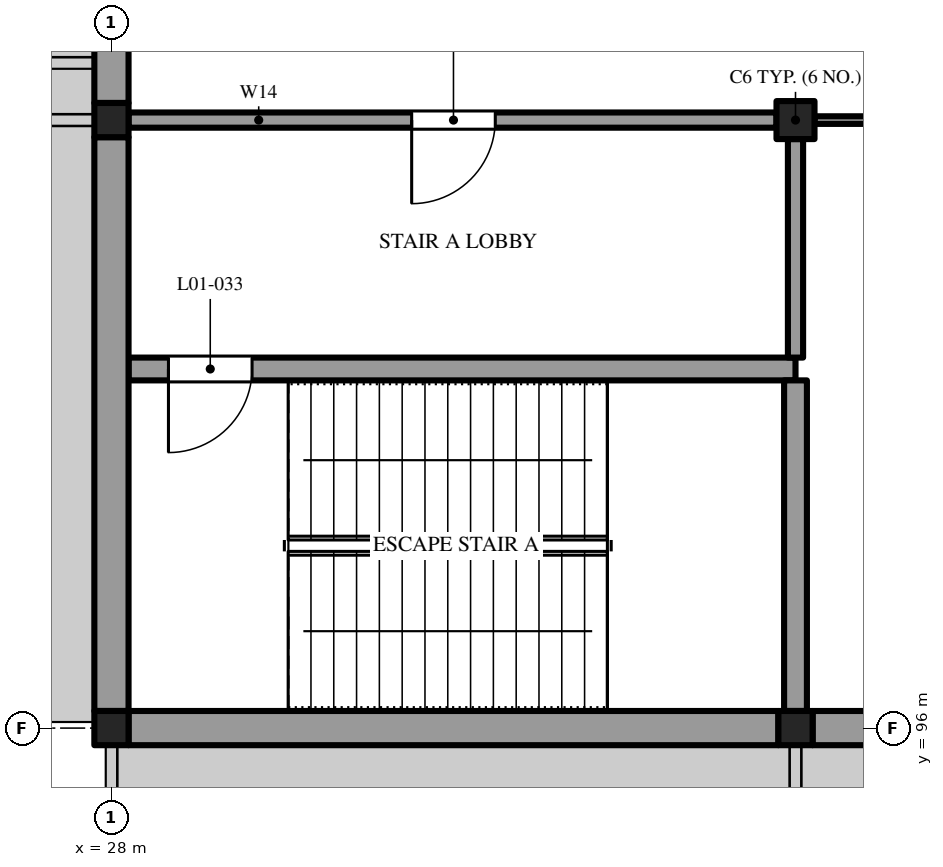
"""IFC4 building model, lengths in metres.
Left out: names, types, materials, properties, quantities, classifications, styles, units other than length and angle.
Written with IfcOpenShell. Run it as: python <this file> out.ifc"""

import sys

from ifc_helpers import new_model, si_unit, direction, frame, frame_2d, origin, origin_2d, place, context, subcontext, project, spatial, rectangle, extrude, element, fill, save


model = new_model("IFC4")
c1 = context("Model", 3, precision=1e-05, world=origin(), true_north=direction((0.0, 1.0)))
c2 = subcontext(c1, "Body", "Model", "MODEL_VIEW")
j1 = project(units=[si_unit("LENGTHUNIT", "METRE"), si_unit("PLANEANGLEUNIT", "RADIAN")], contexts=[c1])
p1 = place(None, origin())
s1 = spatial("IfcSite", under=j1, at=p1, CompositionType="ELEMENT")
p2 = place(p1, origin())
s2 = spatial("IfcBuilding", under=s1, at=p2, CompositionType="ELEMENT")
p3 = place(p2, frame((0.0, 0.0, 7.2)))
s3 = spatial("IfcBuildingStorey", under=s2, at=p3, CompositionType="ELEMENT", Elevation=7.2)
for number, where, z_axis, x_axis in (
    (1, (28.0, 96.0, 0.0), (0.0, 0.0, 1.0), (1.0, 0.0, 0.0)),
    (2, (28.0, 104.0, 0.0), (0.0, 0.0, 1.0), (1.0, 0.0, 0.0)),
    (3, (37.0, 96.0, 0.0), (0.0, 0.0, 1.0), (1.0, 0.0, 0.0)),
):
    element("IfcColumn", number, at=place(p3, frame(where, z_axis=z_axis, x_axis=x_axis)), inside=s3, PredefinedType="COLUMN", context=c2, shape_type="SweptSolid", body=[
        extrude(rectangle(XDim=0.45, YDim=0.45, at=origin_2d()), origin(), (0.0, 0.0, 1.0), 4.8),
    ])
p4 = place(p3, frame((37.0, 104.0, 0.0), z_axis=(0.0, 0.0, 1.0), x_axis=(1.0, 0.0, 0.0)))
e4 = element("IfcColumn", 4, at=p4, inside=s3, PredefinedType="COLUMN", context=c2, shape_type="SweptSolid", body=[
    extrude(rectangle(XDim=0.5, YDim=0.5, at=origin_2d()), origin(), (0.0, 0.0, 1.0), 4.8),
])
p5 = place(p3, frame((28.225, 96.0, 0.0), z_axis=(0.0, 0.0, 1.0), x_axis=(1.0, 0.0, 0.0)))
e5 = element("IfcWall", 5, at=p5, inside=s3, PredefinedType="SOLIDWALL", context=c2, shape_type="SweptSolid", body=[
    extrude(rectangle(XDim=8.55, YDim=0.45, at=frame_2d((4.275, 0.0))), origin(), (0.0, 0.0, 1.0), 4.5),
])
p6 = place(p3, frame((37.225, 96.0, 0.0), z_axis=(0.0, 0.0, 1.0), x_axis=(1.0, 0.0, 0.0)))
e6 = element("IfcWall", 6, at=p6, inside=s3, PredefinedType="SOLIDWALL", context=c2, shape_type="SweptSolid", body=[
    extrude(rectangle(XDim=8.55, YDim=0.45, at=frame_2d((4.275, 0.0))), origin(), (0.0, 0.0, 1.0), 4.5),
])
p7 = place(p6, frame((0.975, 0.0, 0.9)))
e7 = element("IfcOpeningElement", 7, at=p7, cuts=e6, PredefinedType="OPENING", context=c2, shape_type="SweptSolid", body=[
    extrude(rectangle(XDim=2.1, YDim=2.2, at=frame_2d((1.05, 1.1))), frame((0.0, 0.235, 0.0), z_axis=(0.0, -1.0, 0.0), x_axis=(1.0, 0.0, 0.0)), (0.0, 0.0, 1.0), 0.47),
])
p8 = place(p6, frame((5.475, 0.0, 0.9)))
e8 = element("IfcOpeningElement", 8, at=p8, cuts=e6, PredefinedType="OPENING", context=c2, shape_type="SweptSolid", body=[
    extrude(rectangle(XDim=2.1, YDim=2.2, at=frame_2d((1.05, 1.1))), frame((0.0, 0.235, 0.0), z_axis=(0.0, -1.0, 0.0), x_axis=(1.0, 0.0, 0.0)), (0.0, 0.0, 1.0), 0.47),
])
p9 = place(p3, frame((28.225, 100.725, 0.0), z_axis=(0.0, 0.0, 1.0), x_axis=(1.0, 0.0, 0.0)))
e9 = element("IfcWall", 9, at=p9, inside=s3, PredefinedType="SHEAR", context=c2, shape_type="SweptSolid", body=[
    extrude(rectangle(XDim=8.775, YDim=0.3, at=frame_2d((4.387, 0.0))), origin(), (0.0, 0.0, 1.0), 4.5),
])
p10 = place(p9, frame((0.525, 0.0, 0.0)))
e10 = element("IfcOpeningElement", 10, at=p10, cuts=e9, PredefinedType="OPENING", context=c2, shape_type="SweptSolid", body=[
    extrude(rectangle(XDim=1.1, YDim=2.1, at=frame_2d((0.55, 1.05))), frame((0.0, 0.16, 0.0), z_axis=(0.0, -1.0, 0.0), x_axis=(1.0, 0.0, 0.0)), (0.0, 0.0, 1.0), 0.32),
])
p11 = place(p3, frame((28.225, 104.0, 0.0), z_axis=(0.0, 0.0, 1.0), x_axis=(1.0, 0.0, 0.0)))
e11 = element("IfcWall", 11, at=p11, inside=s3, PredefinedType="SOLIDWALL", context=c2, shape_type="SweptSolid", body=[
    extrude(rectangle(XDim=8.525, YDim=0.2, at=frame_2d((4.262, 0.0))), origin(), (0.0, 0.0, 1.0), 4.5),
])
p12 = place(p11, frame((3.725, 0.0, 0.0)))
e12 = element("IfcOpeningElement", 12, at=p12, cuts=e11, PredefinedType="OPENING", context=c2, shape_type="SweptSolid", body=[
    extrude(rectangle(XDim=1.1, YDim=2.1, at=frame_2d((0.55, 1.05))), frame((0.0, 0.11, 0.0), z_axis=(0.0, -1.0, 0.0), x_axis=(1.0, 0.0, 0.0)), (0.0, 0.0, 1.0), 0.22),
])
p13 = place(p3, frame((37.25, 104.0, 0.0), z_axis=(0.0, 0.0, 1.0), x_axis=(1.0, 0.0, 0.0)))
e13 = element("IfcWall", 13, at=p13, inside=s3, PredefinedType="PARTITIONING", context=c2, shape_type="SweptSolid", body=[
    extrude(rectangle(XDim=8.5, YDim=0.1, at=frame_2d((4.25, 0.0))), origin(), (0.0, 0.0, 1.0), 4.5),
])
p14 = place(p13, frame((5.25, 0.0, 0.0)))
e14 = element("IfcOpeningElement", 14, at=p14, cuts=e13, PredefinedType="OPENING", context=c2, shape_type="SweptSolid", body=[
    extrude(rectangle(XDim=1.0, YDim=2.1, at=frame_2d((0.5, 1.05))), frame((0.0, 0.06, 0.0), z_axis=(0.0, -1.0, 0.0), x_axis=(1.0, 0.0, 0.0)), (0.0, 0.0, 1.0), 0.12),
])
p15 = place(p3, frame((28.0, 103.775, 0.0), z_axis=(0.0, 0.0, 1.0), x_axis=(0.0, -1.0, 0.0)))
e15 = element("IfcWall", 15, at=p15, inside=s3, PredefinedType="SOLIDWALL", context=c2, shape_type="SweptSolid", body=[
    extrude(rectangle(XDim=7.55, YDim=0.45, at=frame_2d((3.775, 0.0))), origin(), (0.0, 0.0, 1.0), 4.5),
])
p16 = place(p3, frame((28.0, 111.775, 0.0), z_axis=(0.0, 0.0, 1.0), x_axis=(0.0, -1.0, 0.0)))
e16 = element("IfcWall", 16, at=p16, inside=s3, PredefinedType="SOLIDWALL", context=c2, shape_type="SweptSolid", body=[
    extrude(rectangle(XDim=7.55, YDim=0.45, at=frame_2d((3.775, 0.0))), origin(), (0.0, 0.0, 1.0), 4.5),
])
p17 = place(p16, frame((4.725, 0.0, 0.9)))
e17 = element("IfcOpeningElement", 17, at=p17, cuts=e16, PredefinedType="OPENING", context=c2, shape_type="SweptSolid", body=[
    extrude(rectangle(XDim=2.1, YDim=2.2, at=frame_2d((1.05, 1.1))), frame((0.0, 0.235, 0.0), z_axis=(0.0, -1.0, 0.0), x_axis=(1.0, 0.0, 0.0)), (0.0, 0.0, 1.0), 0.47),
])
p18 = place(p16, frame((0.725, 0.0, 0.9)))
e18 = element("IfcOpeningElement", 18, at=p18, cuts=e16, PredefinedType="OPENING", context=c2, shape_type="SweptSolid", body=[
    extrude(rectangle(XDim=2.1, YDim=2.2, at=frame_2d((1.05, 1.1))), frame((0.0, 0.235, 0.0), z_axis=(0.0, -1.0, 0.0), x_axis=(1.0, 0.0, 0.0)), (0.0, 0.0, 1.0), 0.47),
])
p19 = place(p3, frame((37.0, 96.225, 0.0), z_axis=(0.0, 0.0, 1.0), x_axis=(0.0, 1.0, 0.0)))
e19 = element("IfcWall", 19, at=p19, inside=s3, PredefinedType="SHEAR", context=c2, shape_type="SweptSolid", body=[
    extrude(rectangle(XDim=4.35, YDim=0.3, at=frame_2d((2.175, 0.0))), origin(), (0.0, 0.0, 1.0), 4.5),
])
p20 = place(p3, frame((37.0, 100.875, 0.0), z_axis=(0.0, 0.0, 1.0), x_axis=(0.0, 1.0, 0.0)))
e20 = element("IfcWall", 20, at=p20, inside=s3, PredefinedType="SOLIDWALL", context=c2, shape_type="SweptSolid", body=[
    extrude(rectangle(XDim=2.875, YDim=0.2, at=frame_2d((1.438, 0.0))), origin(), (0.0, 0.0, 1.0), 4.5),
])
p21 = place(p12, frame((1.1, 0.0, 0.0), z_axis=(0.0, 0.0, 1.0), x_axis=(-1.0, 0.0, 0.0)))
e21 = element("IfcDoor", 21, at=p21, inside=s3, OperationType="SINGLE_SWING_RIGHT", PredefinedType="DOOR", context=c2, shape_type="SweptSolid", body=[
    extrude(rectangle(XDim=1.1, YDim=2.1, at=frame_2d((0.55, 1.05))), frame((0.0, 0.025, 0.0), z_axis=(0.0, -1.0, 0.0), x_axis=(1.0, 0.0, 0.0)), (0.0, 0.0, 1.0), 0.05),
])
fill(e12, e21)
p22 = place(p10, frame((1.1, 0.0, 0.0), z_axis=(0.0, 0.0, 1.0), x_axis=(-1.0, 0.0, 0.0)))
e22 = element("IfcDoor", 22, at=p22, inside=s3, OperationType="SINGLE_SWING_LEFT", PredefinedType="DOOR", context=c2, shape_type="SweptSolid", body=[
    extrude(rectangle(XDim=1.1, YDim=2.1, at=frame_2d((0.55, 1.05))), frame((0.0, 0.025, 0.0), z_axis=(0.0, -1.0, 0.0), x_axis=(1.0, 0.0, 0.0)), (0.0, 0.0, 1.0), 0.05),
])
fill(e10, e22)
save(model, sys.argv[1])
